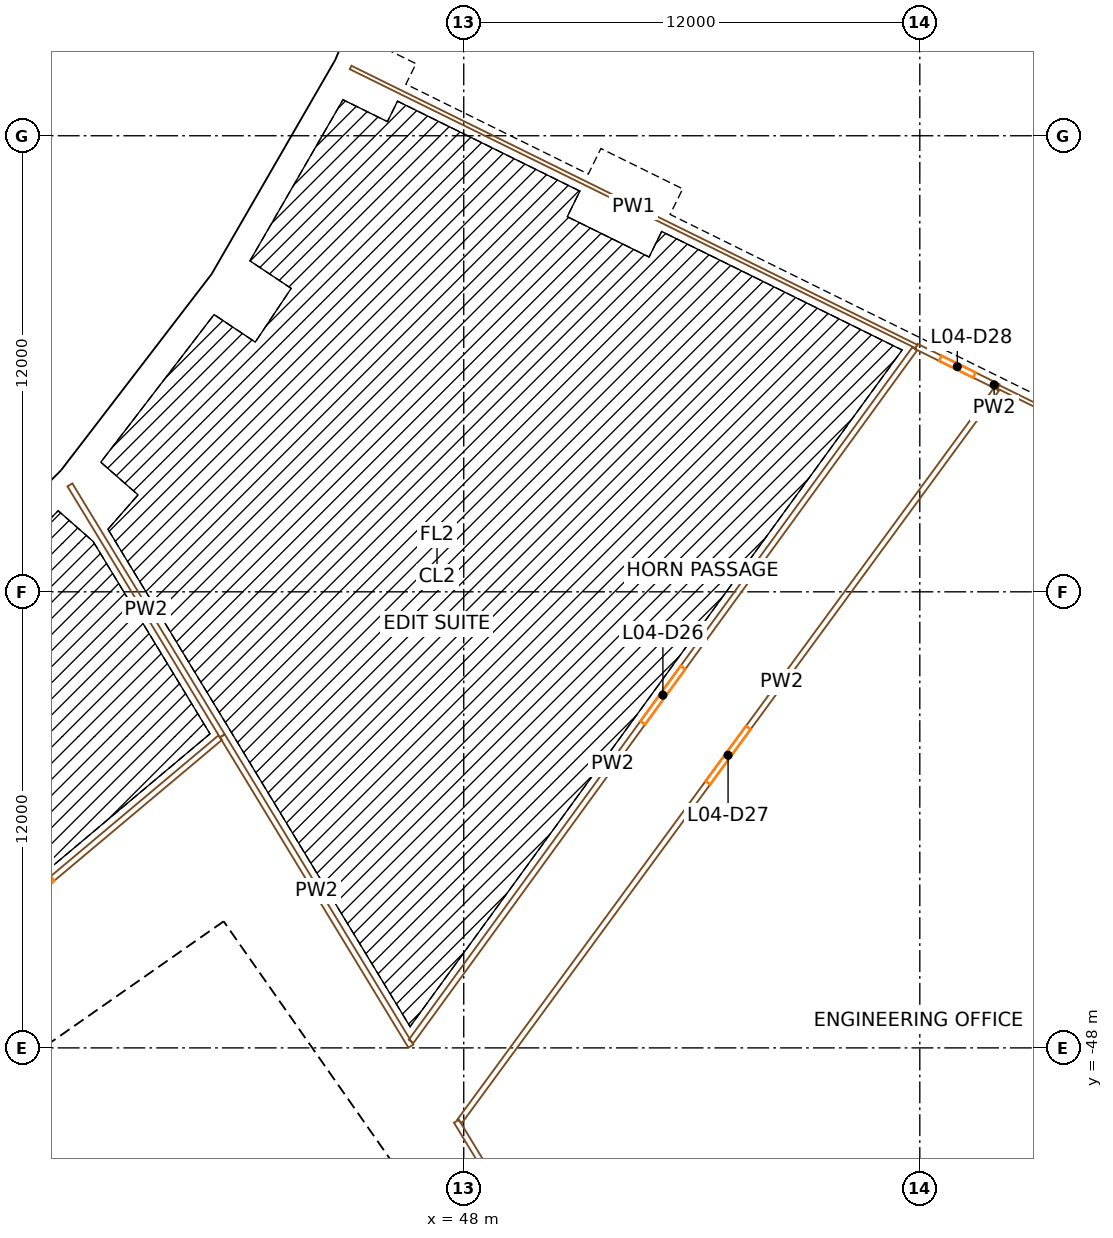
"""IFC4 building model, lengths in metres.
Left out: names, types, materials, properties, quantities, classifications, styles, units other than length and angle.
Written with IfcOpenShell. Run it as: python <this file> out.ifc"""

import sys

from ifc_helpers import new_model, si_unit, direction, frame, frame_2d, origin, origin_2d, place, context, subcontext, project, spatial, rectangle, extrude, element, fill, save


model = new_model("IFC4")
c1 = context("Model", 3, precision=1e-05, world=origin(), true_north=direction((0.0, 1.0)))
c2 = subcontext(c1, "Body", "Model", "MODEL_VIEW")
j1 = project(units=[si_unit("LENGTHUNIT", "METRE"), si_unit("PLANEANGLEUNIT", "RADIAN")], contexts=[c1])
p1 = place(None, origin())
s1 = spatial("IfcSite", under=j1, at=p1, CompositionType="ELEMENT")
p2 = place(p1, origin())
s2 = spatial("IfcBuilding", under=s1, at=p2, CompositionType="ELEMENT")
p3 = place(p2, frame((0.0, 0.0, 31.5)))
s3 = spatial("IfcBuildingStorey", under=s2, at=p3, CompositionType="ELEMENT", Elevation=31.5)
p4 = place(p3, frame((38.407, -43.795, 0.0), z_axis=(0.0, 0.0, 1.0), x_axis=(0.751839807479, 0.6593458151, 0.0)))
e1 = element("IfcColumn", 1, at=p4, inside=s3, PredefinedType="COLUMN", context=c2, shape_type="SweptSolid", body=[
    extrude(rectangle(XDim=1.4, YDim=1.8, at=origin_2d()), origin(), (0.0, 0.0, 1.0), 4.5),
])
p5 = place(p3, frame((38.156, -33.462, 0.0), z_axis=(0.0, 0.0, 1.0), x_axis=(0.6593458151, 0.751839807479, 0.0)))
e2 = element("IfcColumn", 2, at=p5, inside=s3, PredefinedType="COLUMN", context=c2, shape_type="SweptSolid", body=[
    extrude(rectangle(XDim=1.1, YDim=1.3, at=origin_2d()), origin(), (0.0, 0.0, 1.0), 4.5),
])
for number, where, z_axis, x_axis in (
    (3, (43.795, -38.407, 0.0), (0.0, 0.0, 1.0), (0.659, 0.752, 0.0)),
    (4, (58.456, -51.264, 0.0), (0.0, 0.0, 1.0), (0.659, 0.752, 0.0)),
):
    element("IfcColumn", number, at=place(p3, frame(where, z_axis=z_axis, x_axis=x_axis)), inside=s3, PredefinedType="COLUMN", context=c2, shape_type="SweptSolid", body=[
        extrude(rectangle(XDim=1.4, YDim=1.8, at=origin_2d()), origin(), (0.0, 0.0, 1.0), 4.5),
    ])
p6 = place(p3, frame((42.197, -28.195, 0.0), z_axis=(0.0, 0.0, 1.0), x_axis=(0.55557023302, 0.831469612303, 0.0)))
e5 = element("IfcColumn", 5, at=p6, inside=s3, PredefinedType="COLUMN", context=c2, shape_type="SweptSolid", body=[
    extrude(rectangle(XDim=1.1, YDim=1.3, at=origin_2d()), origin(), (0.0, 0.0, 1.0), 4.5),
])
p7 = place(p3, frame((48.433, -32.362, 0.0), z_axis=(0.0, 0.0, 1.0), x_axis=(0.55557023302, 0.831469612303, 0.0)))
e6 = element("IfcColumn", 6, at=p7, inside=s3, PredefinedType="COLUMN", context=c2, shape_type="SweptSolid", body=[
    extrude(rectangle(XDim=1.4, YDim=1.8, at=origin_2d()), origin(), (0.0, 0.0, 1.0), 4.5),
])
p8 = place(p3, frame((45.516, -22.446, 0.0), z_axis=(0.0, 0.0, 1.0), x_axis=(0.442288690219, 0.896872741533, 0.0)))
e7 = element("IfcColumn", 7, at=p8, inside=s3, PredefinedType="COLUMN", context=c2, shape_type="SweptSolid", body=[
    extrude(rectangle(XDim=1.1, YDim=1.3, at=origin_2d()), origin(), (0.0, 0.0, 1.0), 4.5),
])
p9 = place(p3, frame((52.243, -25.763, 0.0), z_axis=(0.0, 0.0, 1.0), x_axis=(0.442288690219, 0.896872741533, 0.0)))
e8 = element("IfcColumn", 8, at=p9, inside=s3, PredefinedType="COLUMN", context=c2, shape_type="SweptSolid", body=[
    extrude(rectangle(XDim=1.4, YDim=1.8, at=origin_2d()), origin(), (0.0, 0.0, 1.0), 4.5),
])
p10 = place(p3, frame((49.779, -57.191, 0.0), z_axis=(0.0, 0.0, 1.0), x_axis=(-0.573577477574, 0.819151315216, 0.0)))
e9 = element("IfcWall", 9, at=p10, inside=s3, PredefinedType="SHEAR", context=c2, shape_type="SweptSolid", body=[
    extrude(rectangle(XDim=14.8, YDim=0.9, at=frame_2d((7.4, 0.0))), origin(), (0.0, 0.0, 1.0), 4.1),
])
p11 = place(p10, frame((6.7, 0.0, 0.0)))
e10 = element("IfcOpeningElement", 10, at=p11, cuts=e9, PredefinedType="OPENING", context=c2, shape_type="SweptSolid", body=[
    extrude(rectangle(XDim=1.4, YDim=2.1, at=frame_2d((0.7, 1.05))), frame((0.0, 0.46, 0.0), z_axis=(0.0, -1.0, 0.0), x_axis=(1.0, 0.0, 0.0)), (0.0, 0.0, 1.0), 0.92),
])
p12 = place(p3, frame((28.854, -54.324, 0.0), z_axis=(0.0, 0.0, 1.0), x_axis=(0.819145767589, 0.573585400304, 0.0)))
e11 = element("IfcWall", 11, at=p12, inside=s3, PredefinedType="SHEAR", context=c2, shape_type="SweptSolid", body=[
    extrude(rectangle(XDim=15.045, YDim=0.9, at=frame_2d((7.523, 0.0))), origin(), (0.0, 0.0, 1.0), 4.1),
])
p13 = place(p12, frame((1.05, 0.0, 0.0)))
e12 = element("IfcOpeningElement", 12, at=p13, cuts=e11, PredefinedType="OPENING", context=c2, shape_type="SweptSolid", body=[
    extrude(rectangle(XDim=0.9, YDim=2.1, at=frame_2d((0.45, 1.05))), frame((0.0, 0.46, 0.0), z_axis=(0.0, -1.0, 0.0), x_axis=(1.0, 0.0, 0.0)), (0.0, 0.0, 1.0), 0.92),
])
p14 = place(p12, frame((3.775, 0.0, 0.0)))
e13 = element("IfcOpeningElement", 13, at=p14, cuts=e11, PredefinedType="OPENING", context=c2, shape_type="SweptSolid", body=[
    extrude(rectangle(XDim=1.0, YDim=2.1, at=frame_2d((0.5, 1.05))), frame((0.0, 0.46, 0.0), z_axis=(0.0, -1.0, 0.0), x_axis=(1.0, 0.0, 0.0)), (0.0, 0.0, 1.0), 0.92),
])
p15 = place(p12, frame((6.275, 0.0, 0.0)))
e14 = element("IfcOpeningElement", 14, at=p15, cuts=e11, PredefinedType="OPENING", context=c2, shape_type="SweptSolid", body=[
    extrude(rectangle(XDim=1.0, YDim=2.1, at=frame_2d((0.5, 1.05))), frame((0.0, 0.46, 0.0), z_axis=(0.0, -1.0, 0.0), x_axis=(1.0, 0.0, 0.0)), (0.0, 0.0, 1.0), 0.92),
])
p16 = place(p12, frame((13.495, 0.0, 0.0)))
e15 = element("IfcOpeningElement", 15, at=p16, cuts=e11, PredefinedType="OPENING", context=c2, shape_type="SweptSolid", body=[
    extrude(rectangle(XDim=1.1, YDim=2.1, at=frame_2d((0.55, 1.05))), frame((0.0, 0.46, 0.0), z_axis=(0.0, -1.0, 0.0), x_axis=(1.0, 0.0, 0.0)), (0.0, 0.0, 1.0), 0.92),
])
p17 = place(p3, frame((43.204, -60.696, 0.0), z_axis=(0.0, 0.0, 1.0), x_axis=(-0.573571992966, 0.819155155563, 0.0)))
e16 = element("IfcWall", 16, at=p17, inside=s3, PredefinedType="SOLIDWALL", context=c2, shape_type="SweptSolid", body=[
    extrude(rectangle(XDim=13.0, YDim=0.3, at=frame_2d((6.5, 0.0))), origin(), (0.0, 0.0, 1.0), 4.1),
])
p18 = place(p3, frame((37.936, -52.91, 0.0), z_axis=(0.0, 0.0, 1.0), x_axis=(0.819147518138, 0.57358290031, 0.0)))
e17 = element("IfcWall", 17, at=p18, inside=s3, PredefinedType="SOLIDWALL", context=c2, shape_type="SweptSolid", body=[
    extrude(rectangle(XDim=6.795, YDim=0.3, at=frame_2d((3.398, 0.0))), origin(), (0.0, 0.0, 1.0), 4.1),
])
p19 = place(p18, frame((5.32, 0.0, 0.0)))
e18 = element("IfcOpeningElement", 18, at=p19, cuts=e17, PredefinedType="OPENING", context=c2, shape_type="SweptSolid", body=[
    extrude(rectangle(XDim=1.1, YDim=2.1, at=frame_2d((0.55, 1.05))), frame((0.0, 0.16, 0.0), z_axis=(0.0, -1.0, 0.0), x_axis=(1.0, 0.0, 0.0)), (0.0, 0.0, 1.0), 0.32),
])
p20 = place(p3, frame((37.532, -32.993, 0.0), z_axis=(0.0, 0.0, 1.0), x_axis=(-0.707106781187, -0.707106781187, 0.0)))
e19 = element("IfcWall", 19, at=p20, inside=s3, PredefinedType="SOLIDWALL", context=c2, shape_type="SweptSolid", body=[
    extrude(rectangle(XDim=6.419, YDim=0.45, at=frame_2d((3.209, 0.0))), origin(), (0.0, 0.0, 1.0), 3.2),
])
p21 = place(p20, frame((3.66, 0.0, 0.9)))
e20 = element("IfcOpeningElement", 20, at=p21, cuts=e19, PredefinedType="OPENING", context=c2, shape_type="SweptSolid", body=[
    extrude(rectangle(XDim=1.2, YDim=2.15, at=frame_2d((0.6, 1.075))), frame((0.0, 0.235, 0.0), z_axis=(0.0, -1.0, 0.0), x_axis=(1.0, 0.0, 0.0)), (0.0, 0.0, 1.0), 0.47),
])
p22 = place(p20, frame((1.56, 0.0, 0.9)))
e21 = element("IfcOpeningElement", 21, at=p22, cuts=e19, PredefinedType="OPENING", context=c2, shape_type="SweptSolid", body=[
    extrude(rectangle(XDim=1.2, YDim=2.15, at=frame_2d((0.6, 1.075))), frame((0.0, 0.235, 0.0), z_axis=(0.0, -1.0, 0.0), x_axis=(1.0, 0.0, 0.0)), (0.0, 0.0, 1.0), 0.47),
])
p23 = place(p3, frame((41.571, -27.741, 0.0), z_axis=(0.0, 0.0, 1.0), x_axis=(-0.608780327927, -0.793338838284, 0.0)))
e22 = element("IfcWall", 22, at=p23, inside=s3, PredefinedType="SOLIDWALL", context=c2, shape_type="SweptSolid", body=[
    extrude(rectangle(XDim=6.597, YDim=0.45, at=frame_2d((3.298, 0.0))), origin(), (0.0, 0.0, 1.0), 3.2),
])
p24 = place(p23, frame((3.749, 0.0, 0.9)))
e23 = element("IfcOpeningElement", 23, at=p24, cuts=e22, PredefinedType="OPENING", context=c2, shape_type="SweptSolid", body=[
    extrude(rectangle(XDim=1.2, YDim=2.15, at=frame_2d((0.6, 1.075))), frame((0.0, 0.235, 0.0), z_axis=(0.0, -1.0, 0.0), x_axis=(1.0, 0.0, 0.0)), (0.0, 0.0, 1.0), 0.47),
])
p25 = place(p23, frame((1.648, 0.0, 0.9)))
e24 = element("IfcOpeningElement", 24, at=p25, cuts=e22, PredefinedType="OPENING", context=c2, shape_type="SweptSolid", body=[
    extrude(rectangle(XDim=1.2, YDim=2.15, at=frame_2d((0.6, 1.075))), frame((0.0, 0.235, 0.0), z_axis=(0.0, -1.0, 0.0), x_axis=(1.0, 0.0, 0.0)), (0.0, 0.0, 1.0), 0.47),
])
p26 = place(p3, frame((44.792, -22.155, 0.0), z_axis=(0.0, 0.0, 1.0), x_axis=(-0.50000447882, -0.866022817921, 0.0)))
e25 = element("IfcWall", 25, at=p26, inside=s3, PredefinedType="SOLIDWALL", context=c2, shape_type="SweptSolid", body=[
    extrude(rectangle(XDim=6.419, YDim=0.45, at=frame_2d((3.21, 0.0))), origin(), (0.0, 0.0, 1.0), 3.2),
])
p27 = place(p26, frame((3.66, 0.0, 0.9)))
e26 = element("IfcOpeningElement", 26, at=p27, cuts=e25, PredefinedType="OPENING", context=c2, shape_type="SweptSolid", body=[
    extrude(rectangle(XDim=1.2, YDim=2.15, at=frame_2d((0.6, 1.075))), frame((0.0, 0.235, 0.0), z_axis=(0.0, -1.0, 0.0), x_axis=(1.0, 0.0, 0.0)), (0.0, 0.0, 1.0), 0.47),
])
p28 = place(p26, frame((1.56, 0.0, 0.9)))
e27 = element("IfcOpeningElement", 27, at=p28, cuts=e25, PredefinedType="OPENING", context=c2, shape_type="SweptSolid", body=[
    extrude(rectangle(XDim=1.2, YDim=2.15, at=frame_2d((0.6, 1.075))), frame((0.0, 0.235, 0.0), z_axis=(0.0, -1.0, 0.0), x_axis=(1.0, 0.0, 0.0)), (0.0, 0.0, 1.0), 0.47),
])
p29 = place(p3, frame((47.327, -16.056, 0.0), z_axis=(0.0, 0.0, 1.0), x_axis=(-0.382692796414, -0.92387565374, 0.0)))
e28 = element("IfcWall", 28, at=p29, inside=s3, PredefinedType="SOLIDWALL", context=c2, shape_type="SweptSolid", body=[
    extrude(rectangle(XDim=6.576, YDim=0.45, at=frame_2d((3.288, 0.0))), origin(), (0.0, 0.0, 1.0), 3.2),
])
p30 = place(p29, frame((3.727, 0.0, 0.9)))
e29 = element("IfcOpeningElement", 29, at=p30, cuts=e28, PredefinedType="OPENING", context=c2, shape_type="SweptSolid", body=[
    extrude(rectangle(XDim=1.2, YDim=2.15, at=frame_2d((0.6, 1.075))), frame((0.0, 0.235, 0.0), z_axis=(0.0, -1.0, 0.0), x_axis=(1.0, 0.0, 0.0)), (0.0, 0.0, 1.0), 0.47),
])
p31 = place(p29, frame((1.627, 0.0, 0.9)))
e30 = element("IfcOpeningElement", 30, at=p31, cuts=e28, PredefinedType="OPENING", context=c2, shape_type="SweptSolid", body=[
    extrude(rectangle(XDim=1.2, YDim=2.15, at=frame_2d((0.6, 1.075))), frame((0.0, 0.235, 0.0), z_axis=(0.0, -1.0, 0.0), x_axis=(1.0, 0.0, 0.0)), (0.0, 0.0, 1.0), 0.47),
])
p32 = place(p3, frame((32.001, -47.893, 0.0), z_axis=(0.0, 0.0, 1.0), x_axis=(0.765734049768, 0.643157340801, 0.0)))
e31 = element("IfcWall", 31, at=p32, inside=s3, PredefinedType="PARTITIONING", context=c2, shape_type="SweptSolid", body=[
    extrude(rectangle(XDim=12.524, YDim=0.15, at=frame_2d((6.262, 0.0))), origin(), (0.0, 0.0, 1.0), 3.1),
])
p33 = place(p32, frame((5.762, 0.0, 0.0)))
e32 = element("IfcOpeningElement", 32, at=p33, cuts=e31, PredefinedType="OPENING", context=c2, shape_type="SweptSolid", body=[
    extrude(rectangle(XDim=1.0, YDim=2.1, at=frame_2d((0.5, 1.05))), frame((0.0, 0.085, 0.0), z_axis=(0.0, -1.0, 0.0), x_axis=(1.0, 0.0, 0.0)), (0.0, 0.0, 1.0), 0.17),
])
p34 = place(p3, frame((37.638, -33.187, 0.0), z_axis=(0.0, 0.0, 1.0), x_axis=(0.519163683086, -0.854674833, 0.0)))
e33 = element("IfcWall", 33, at=p34, inside=s3, PredefinedType="PARTITIONING", context=c2, shape_type="SweptSolid", body=[
    extrude(rectangle(XDim=7.725, YDim=0.15, at=frame_2d((3.862, 0.0))), origin(), (0.0, 0.0, 1.0), 3.1),
])
p35 = place(p3, frame((41.648, -39.789, 0.0), z_axis=(0.0, 0.0, 1.0), x_axis=(0.519144162426, -0.854686690325, 0.0)))
e34 = element("IfcWall", 34, at=p35, inside=s3, PredefinedType="PARTITIONING", context=c2, shape_type="SweptSolid", body=[
    extrude(rectangle(XDim=9.554, YDim=0.15, at=frame_2d((4.777, 0.0))), origin(), (0.0, 0.0, 1.0), 3.1),
])
p36 = place(p3, frame((46.614, -47.83, 0.0), z_axis=(0.0, 0.0, 1.0), x_axis=(0.588142064446, 0.808757634912, 0.0)))
e35 = element("IfcWall", 35, at=p36, inside=s3, PredefinedType="PARTITIONING", context=c2, shape_type="SweptSolid", body=[
    extrude(rectangle(XDim=22.534, YDim=0.15, at=frame_2d((11.267, 0.0))), origin(), (0.0, 0.0, 1.0), 3.1),
])
p37 = place(p36, frame((10.367, 0.0, 0.0)))
e36 = element("IfcOpeningElement", 36, at=p37, cuts=e35, PredefinedType="OPENING", context=c2, shape_type="SweptSolid", body=[
    extrude(rectangle(XDim=1.8, YDim=2.1, at=frame_2d((0.9, 1.05))), frame((0.0, 0.085, 0.0), z_axis=(0.0, -1.0, 0.0), x_axis=(1.0, 0.0, 0.0)), (0.0, 0.0, 1.0), 0.17),
])
p38 = place(p3, frame((47.808, -49.929, 0.0), z_axis=(0.0, 0.0, 1.0), x_axis=(0.519169679695, -0.854671190392, 0.0)))
e37 = element("IfcWall", 37, at=p38, inside=s3, PredefinedType="PARTITIONING", context=c2, shape_type="SweptSolid", body=[
    extrude(rectangle(XDim=9.878, YDim=0.15, at=frame_2d((4.939, 0.0))), origin(), (0.0, 0.0, 1.0), 3.1),
])
p39 = place(p3, frame((62.019, -30.667, 0.0), z_axis=(0.0, 0.0, 1.0), x_axis=(-0.59135701849, -0.806409868915, 0.0)))
e38 = element("IfcWall", 38, at=p39, inside=s3, PredefinedType="PARTITIONING", context=c2, shape_type="SweptSolid", body=[
    extrude(rectangle(XDim=23.892, YDim=0.15, at=frame_2d((11.946, 0.0))), origin(), (0.0, 0.0, 1.0), 3.1),
])
p40 = place(p39, frame((11.046, 0.0, 0.0)))
e39 = element("IfcOpeningElement", 39, at=p40, cuts=e38, PredefinedType="OPENING", context=c2, shape_type="SweptSolid", body=[
    extrude(rectangle(XDim=1.8, YDim=2.1, at=frame_2d((0.9, 1.05))), frame((0.0, 0.085, 0.0), z_axis=(0.0, -1.0, 0.0), x_axis=(1.0, 0.0, 0.0)), (0.0, 0.0, 1.0), 0.17),
])
p41 = place(p3, frame((59.911, -29.545, 0.0), z_axis=(0.0, 0.0, 1.0), x_axis=(-0.896872708689, 0.44228875682, 0.0)))
e40 = element("IfcWall", 40, at=p41, inside=s3, PredefinedType="PARTITIONING", context=c2, shape_type="SweptSolid", body=[
    extrude(rectangle(XDim=16.6, YDim=0.1, at=frame_2d((8.3, 0.0))), origin(), (0.0, 0.0, 1.0), 3.1),
])
p42 = place(p3, frame((59.911, -29.545, 0.0), z_axis=(0.0, 0.0, 1.0), x_axis=(0.896855391649, -0.442323870564, 0.0)))
e41 = element("IfcWall", 41, at=p42, inside=s3, PredefinedType="PARTITIONING", context=c2, shape_type="SweptSolid", body=[
    extrude(rectangle(XDim=2.4, YDim=0.15, at=frame_2d((1.2, 0.0))), origin(), (0.0, 0.0, 1.0), 3.1),
])
p43 = place(p42, frame((0.7, 0.0, 0.0)))
e42 = element("IfcOpeningElement", 42, at=p43, cuts=e41, PredefinedType="OPENING", context=c2, shape_type="SweptSolid", body=[
    extrude(rectangle(XDim=1.0, YDim=2.1, at=frame_2d((0.5, 1.05))), frame((0.0, 0.085, 0.0), z_axis=(0.0, -1.0, 0.0), x_axis=(1.0, 0.0, 0.0)), (0.0, 0.0, 1.0), 0.17),
])
p44 = place(p3, frame((76.952, -37.948, 0.0), z_axis=(0.0, 0.0, 1.0), x_axis=(-0.896872708689, 0.44228875682, 0.0)))
e43 = element("IfcWall", 43, at=p44, inside=s3, PredefinedType="PARTITIONING", context=c2, shape_type="SweptSolid", body=[
    extrude(rectangle(XDim=16.6, YDim=0.1, at=frame_2d((8.3, 0.0))), origin(), (0.0, 0.0, 1.0), 3.1),
])
p45 = place(p11, origin())
e44 = element("IfcDoor", 44, at=p45, inside=s3, OperationType="DOUBLE_DOOR_SINGLE_SWING", PredefinedType="DOOR", context=c2, shape_type="SweptSolid", body=[
    extrude(rectangle(XDim=1.4, YDim=2.1, at=frame_2d((0.7, 1.05))), frame((0.0, 0.025, 0.0), z_axis=(0.0, -1.0, 0.0), x_axis=(1.0, 0.0, 0.0)), (0.0, 0.0, 1.0), 0.05),
])
fill(e10, e44)
p46 = place(p16, origin())
e45 = element("IfcDoor", 45, at=p46, inside=s3, OperationType="SINGLE_SWING_RIGHT", PredefinedType="DOOR", context=c2, shape_type="SweptSolid", body=[
    extrude(rectangle(XDim=1.1, YDim=2.1, at=frame_2d((0.55, 1.05))), frame((0.0, 0.025, 0.0), z_axis=(0.0, -1.0, 0.0), x_axis=(1.0, 0.0, 0.0)), (0.0, 0.0, 1.0), 0.05),
])
fill(e15, e45)
p47 = place(p19, origin())
e46 = element("IfcDoor", 46, at=p47, inside=s3, OperationType="SINGLE_SWING_LEFT", PredefinedType="DOOR", context=c2, shape_type="SweptSolid", body=[
    extrude(rectangle(XDim=1.1, YDim=2.1, at=frame_2d((0.55, 1.05))), frame((0.0, 0.025, 0.0), z_axis=(0.0, -1.0, 0.0), x_axis=(1.0, 0.0, 0.0)), (0.0, 0.0, 1.0), 0.05),
])
fill(e18, e46)
p48 = place(p24, origin())
e47 = element("IfcWindow", 47, at=p48, inside=s3, PartitioningType="SINGLE_PANEL", PredefinedType="WINDOW", context=c2, shape_type="SweptSolid", body=[
    extrude(rectangle(XDim=1.2, YDim=2.15, at=frame_2d((0.6, 1.075))), frame((0.0, 0.03, 0.0), z_axis=(0.0, -1.0, 0.0), x_axis=(1.0, 0.0, 0.0)), (0.0, 0.0, 1.0), 0.06),
])
fill(e23, e47)
p49 = place(p25, origin())
e48 = element("IfcWindow", 48, at=p49, inside=s3, PartitioningType="SINGLE_PANEL", PredefinedType="WINDOW", context=c2, shape_type="SweptSolid", body=[
    extrude(rectangle(XDim=1.2, YDim=2.15, at=frame_2d((0.6, 1.075))), frame((0.0, 0.03, 0.0), z_axis=(0.0, -1.0, 0.0), x_axis=(1.0, 0.0, 0.0)), (0.0, 0.0, 1.0), 0.06),
])
fill(e24, e48)
p50 = place(p27, origin())
e49 = element("IfcWindow", 49, at=p50, inside=s3, PartitioningType="SINGLE_PANEL", PredefinedType="WINDOW", context=c2, shape_type="SweptSolid", body=[
    extrude(rectangle(XDim=1.2, YDim=2.15, at=frame_2d((0.6, 1.075))), frame((0.0, 0.03, 0.0), z_axis=(0.0, -1.0, 0.0), x_axis=(1.0, 0.0, 0.0)), (0.0, 0.0, 1.0), 0.06),
])
fill(e26, e49)
p51 = place(p28, origin())
e50 = element("IfcWindow", 50, at=p51, inside=s3, PartitioningType="SINGLE_PANEL", PredefinedType="WINDOW", context=c2, shape_type="SweptSolid", body=[
    extrude(rectangle(XDim=1.2, YDim=2.15, at=frame_2d((0.6, 1.075))), frame((0.0, 0.03, 0.0), z_axis=(0.0, -1.0, 0.0), x_axis=(1.0, 0.0, 0.0)), (0.0, 0.0, 1.0), 0.06),
])
fill(e27, e50)
p52 = place(p33, origin())
e51 = element("IfcDoor", 51, at=p52, inside=s3, OperationType="SINGLE_SWING_RIGHT", PredefinedType="DOOR", context=c2, shape_type="SweptSolid", body=[
    extrude(rectangle(XDim=1.0, YDim=2.1, at=frame_2d((0.5, 1.05))), frame((0.0, 0.025, 0.0), z_axis=(0.0, -1.0, 0.0), x_axis=(1.0, 0.0, 0.0)), (0.0, 0.0, 1.0), 0.05),
])
fill(e32, e51)
p53 = place(p37, origin())
e52 = element("IfcDoor", 52, at=p53, inside=s3, OperationType="DOUBLE_DOOR_SINGLE_SWING", PredefinedType="DOOR", context=c2, shape_type="SweptSolid", body=[
    extrude(rectangle(XDim=1.8, YDim=2.1, at=frame_2d((0.9, 1.05))), frame((0.0, 0.025, 0.0), z_axis=(0.0, -1.0, 0.0), x_axis=(1.0, 0.0, 0.0)), (0.0, 0.0, 1.0), 0.05),
])
fill(e36, e52)
p54 = place(p40, origin())
e53 = element("IfcDoor", 53, at=p54, inside=s3, OperationType="DOUBLE_DOOR_SINGLE_SWING", PredefinedType="DOOR", context=c2, shape_type="SweptSolid", body=[
    extrude(rectangle(XDim=1.8, YDim=2.1, at=frame_2d((0.9, 1.05))), frame((0.0, 0.025, 0.0), z_axis=(0.0, -1.0, 0.0), x_axis=(1.0, 0.0, 0.0)), (0.0, 0.0, 1.0), 0.05),
])
fill(e39, e53)
p55 = place(p43, origin())
e54 = element("IfcDoor", 54, at=p55, inside=s3, OperationType="SINGLE_SWING_RIGHT", PredefinedType="DOOR", context=c2, shape_type="SweptSolid", body=[
    extrude(rectangle(XDim=1.0, YDim=2.1, at=frame_2d((0.5, 1.05))), frame((0.0, 0.025, 0.0), z_axis=(0.0, -1.0, 0.0), x_axis=(1.0, 0.0, 0.0)), (0.0, 0.0, 1.0), 0.05),
])
fill(e42, e54)
save(model, sys.argv[1])
